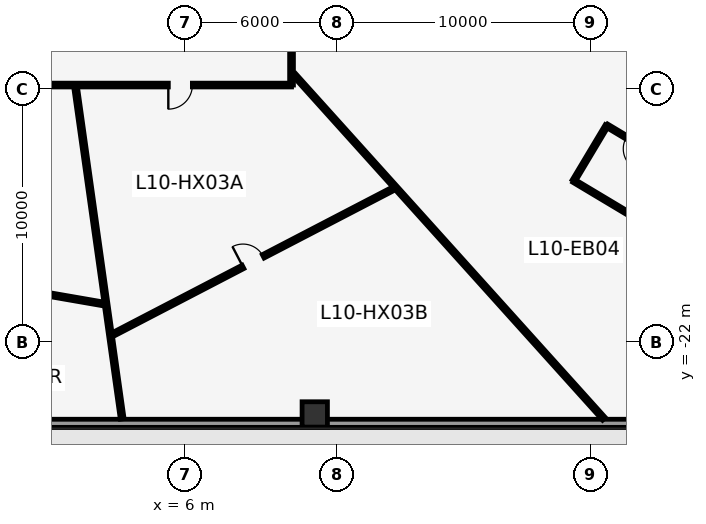
"""IFC4 building model, lengths in metres.
Left out: names, types, materials, properties, quantities, classifications, styles, units other than length and angle.
Written with IfcOpenShell. Run it as: python <this file> out.ifc"""

import sys

from ifc_helpers import new_model, si_unit, direction, frame, frame_2d, origin, origin_2d, place, context, subcontext, project, spatial, rectangle, hollow_rectangle, extrude, element, fill, save


model = new_model("IFC4")
c1 = context("Model", 3, precision=1e-05, world=origin(), true_north=direction((0.0, 1.0)))
c2 = subcontext(c1, "Body", "Model", "MODEL_VIEW")
j1 = project(units=[si_unit("LENGTHUNIT", "METRE"), si_unit("PLANEANGLEUNIT", "RADIAN")], contexts=[c1])
p1 = place(None, origin())
s1 = spatial("IfcSite", under=j1, at=p1, CompositionType="ELEMENT")
p2 = place(p1, origin())
s2 = spatial("IfcBuilding", under=s1, at=p2, CompositionType="ELEMENT")
p3 = place(p2, frame((0.0, 0.0, 50.4)))
s3 = spatial("IfcBuildingStorey", under=s2, at=p3, CompositionType="ELEMENT", Elevation=50.4)
p4 = place(p3, frame((11.117, -24.85, 0.0), z_axis=(0.0, 0.0, 1.0), x_axis=(1.0, 0.0, 0.0)))
e1 = element("IfcColumn", 1, at=p4, inside=s3, PredefinedType="COLUMN", context=c2, shape_type="SweptSolid", body=[
    extrude(hollow_rectangle(XDim=1.0, YDim=1.0, WallThickness=0.06, at=origin_2d()), origin(), (0.0, 0.0, 1.0), 4.0),
])
p5 = place(p3, frame((4.923, 41.122, 0.0), z_axis=(0.0, 0.0, 1.0), x_axis=(0.504213113214, -0.863579258935, 0.0)))
e2 = element("IfcWall", 2, at=p5, inside=s3, PredefinedType="STANDARD", context=c2, shape_type="SweptSolid", body=[
    extrude(rectangle(XDim=67.041, YDim=0.32, at=frame_2d((33.521, 0.0))), origin(), (0.0, 0.0, 1.0), 3.75),
])
p6 = place(p5, frame((33.021, 0.0, 0.0)))
e3 = element("IfcOpeningElement", 3, at=p6, cuts=e2, PredefinedType="OPENING", context=c2, shape_type="SweptSolid", body=[
    extrude(rectangle(XDim=1.0, YDim=2.15, at=frame_2d((0.5, 1.075))), frame((0.0, 0.17, 0.0), z_axis=(0.0, -1.0, 0.0), x_axis=(1.0, 0.0, 0.0)), (0.0, 0.0, 1.0), 0.34),
])
p7 = place(p3, frame((33.888, -25.2, 0.0), z_axis=(0.0, 0.0, 1.0), x_axis=(-1.0, 0.0, 0.0)))
e4 = element("IfcWall", 4, at=p7, inside=s3, PredefinedType="STANDARD", context=c2, shape_type="SweptSolid", body=[
    extrude(rectangle(XDim=67.776, YDim=0.32, at=frame_2d((33.888, 0.0))), origin(), (0.0, 0.0, 1.0), 3.75),
])
p8 = place(p7, frame((33.388, 0.0, 0.0)))
e5 = element("IfcOpeningElement", 5, at=p8, cuts=e4, PredefinedType="OPENING", context=c2, shape_type="SweptSolid", body=[
    extrude(rectangle(XDim=1.0, YDim=2.15, at=frame_2d((0.5, 1.075))), frame((0.0, 0.17, 0.0), z_axis=(0.0, -1.0, 0.0), x_axis=(1.0, 0.0, 0.0)), (0.0, 0.0, 1.0), 0.34),
])
p9 = place(p3, frame((10.2, 12.15, 0.0), z_axis=(0.0, 0.0, 1.0), x_axis=(0.0, -1.0, 0.0)))
e6 = element("IfcWall", 6, at=p9, inside=s3, PredefinedType="PARTITIONING", context=c2, shape_type="SweptSolid", body=[
    extrude(rectangle(XDim=24.0, YDim=0.15, at=frame_2d((12.0, 0.0))), origin(), (0.0, 0.0, 1.0), 3.75),
])
p10 = place(p9, frame((18.691, 0.0, 0.0)))
e7 = element("IfcOpeningElement", 7, at=p10, cuts=e6, PredefinedType="OPENING", context=c2, shape_type="SweptSolid", body=[
    extrude(rectangle(XDim=0.95, YDim=2.15, at=frame_2d((0.475, 1.075))), frame((0.0, 0.085, 0.0), z_axis=(0.0, -1.0, 0.0), x_axis=(1.0, 0.0, 0.0)), (0.0, 0.0, 1.0), 0.17),
])
p11 = place(p9, frame((11.086, 0.0, 0.0)))
e8 = element("IfcOpeningElement", 8, at=p11, cuts=e6, PredefinedType="OPENING", context=c2, shape_type="SweptSolid", body=[
    extrude(rectangle(XDim=0.95, YDim=2.15, at=frame_2d((0.475, 1.075))), frame((0.0, 0.085, 0.0), z_axis=(0.0, -1.0, 0.0), x_axis=(1.0, 0.0, 0.0)), (0.0, 0.0, 1.0), 0.17),
])
p12 = place(p9, frame((4.068, 0.0, 0.0)))
e9 = element("IfcOpeningElement", 9, at=p12, cuts=e6, PredefinedType="OPENING", context=c2, shape_type="SweptSolid", body=[
    extrude(rectangle(XDim=0.95, YDim=2.15, at=frame_2d((0.475, 1.075))), frame((0.0, 0.085, 0.0), z_axis=(0.0, -1.0, 0.0), x_axis=(1.0, 0.0, 0.0)), (0.0, 0.0, 1.0), 0.17),
])
p13 = place(p3, frame((10.2, -11.85, 0.0), z_axis=(0.0, 0.0, 1.0), x_axis=(-1.0, 0.0, 0.0)))
e10 = element("IfcWall", 10, at=p13, inside=s3, PredefinedType="PARTITIONING", context=c2, shape_type="SweptSolid", body=[
    extrude(rectangle(XDim=20.4, YDim=0.15, at=frame_2d((10.2, 0.0))), origin(), (0.0, 0.0, 1.0), 3.75),
])
p14 = place(p13, frame((11.796, 0.0, 0.0)))
e11 = element("IfcOpeningElement", 11, at=p14, cuts=e10, PredefinedType="OPENING", context=c2, shape_type="SweptSolid", body=[
    extrude(rectangle(XDim=0.95, YDim=2.15, at=frame_2d((0.475, 1.075))), frame((0.0, 0.085, 0.0), z_axis=(0.0, -1.0, 0.0), x_axis=(1.0, 0.0, 0.0)), (0.0, 0.0, 1.0), 0.17),
])
p15 = place(p13, frame((3.913, 0.0, 0.0)))
e12 = element("IfcOpeningElement", 12, at=p15, cuts=e10, PredefinedType="OPENING", context=c2, shape_type="SweptSolid", body=[
    extrude(rectangle(XDim=0.95, YDim=2.15, at=frame_2d((0.475, 1.075))), frame((0.0, 0.085, 0.0), z_axis=(0.0, -1.0, 0.0), x_axis=(1.0, 0.0, 0.0)), (0.0, 0.0, 1.0), 0.17),
])
p16 = place(p3, frame((1.68, -11.955, 0.0), z_axis=(0.0, 0.0, 1.0), x_axis=(0.139178306215, -0.990267337177, 0.0)))
e13 = element("IfcWall", 13, at=p16, inside=s3, PredefinedType="PARTITIONING", context=c2, shape_type="SweptSolid", body=[
    extrude(rectangle(XDim=13.198, YDim=0.15, at=frame_2d((6.599, 0.0))), origin(), (0.0, 0.0, 1.0), 3.75),
])
p17 = place(p3, frame((10.305, -11.445, 0.0), z_axis=(0.0, 0.0, 1.0), x_axis=(0.669137434477, -0.743138677355, 0.0)))
e14 = element("IfcWall", 14, at=p17, inside=s3, PredefinedType="PARTITIONING", context=c2, shape_type="SweptSolid", body=[
    extrude(rectangle(XDim=18.274, YDim=0.15, at=frame_2d((9.137, 0.0))), origin(), (0.0, 0.0, 1.0), 3.75),
])
p18 = place(p3, frame((-8.972, -18.453, 0.0), z_axis=(0.0, 0.0, 1.0), x_axis=(0.985300581804, -0.170829632957, 0.0)))
e15 = element("IfcWall", 15, at=p18, inside=s3, PredefinedType="PARTITIONING", context=c2, shape_type="SweptSolid", body=[
    extrude(rectangle(XDim=12.005, YDim=0.15, at=frame_2d((6.002, 0.0))), origin(), (0.0, 0.0, 1.0), 3.254),
])
p19 = place(p18, frame((5.552, 0.0, 0.0)))
e16 = element("IfcOpeningElement", 16, at=p19, cuts=e15, PredefinedType="OPENING", context=c2, shape_type="SweptSolid", body=[
    extrude(rectangle(XDim=0.9, YDim=2.1, at=frame_2d((0.45, 1.05))), frame((0.0, 0.085, 0.0), z_axis=(0.0, -1.0, 0.0), x_axis=(1.0, 0.0, 0.0)), (0.0, 0.0, 1.0), 0.17),
])
p20 = place(p3, frame((3.079, -21.732, 0.0), z_axis=(0.0, 0.0, 1.0), x_axis=(0.887285458414, 0.461220679596, 0.0)))
e17 = element("IfcWall", 17, at=p20, inside=s3, PredefinedType="PARTITIONING", context=c2, shape_type="SweptSolid", body=[
    extrude(rectangle(XDim=12.632, YDim=0.15, at=frame_2d((6.316, 0.0))), origin(), (0.0, 0.0, 1.0), 3.75),
])
p21 = place(p20, frame((5.866, 0.0, 0.0)))
e18 = element("IfcOpeningElement", 18, at=p21, cuts=e17, PredefinedType="OPENING", context=c2, shape_type="SweptSolid", body=[
    extrude(rectangle(XDim=0.9, YDim=2.1, at=frame_2d((0.45, 1.05))), frame((0.0, 0.085, 0.0), z_axis=(0.0, -1.0, 0.0), x_axis=(1.0, 0.0, 0.0)), (0.0, 0.0, 1.0), 0.17),
])
p22 = place(p3, frame((21.337, -15.629, 0.0), z_axis=(0.0, 0.0, 1.0), x_axis=(0.858092929116, -0.513494425482, 0.0)))
e19 = element("IfcWall", 19, at=p22, inside=s3, PredefinedType="PARTITIONING", context=c2, shape_type="SweptSolid", body=[
    extrude(rectangle(XDim=2.69, YDim=0.14, at=frame_2d((1.345, 0.0))), origin(), (0.0, 0.0, 1.0), 3.75),
])
p23 = place(p3, frame((24.95, -14.831, 0.0), z_axis=(0.0, 0.0, 1.0), x_axis=(-0.858092929116, 0.513494425482, 0.0)))
e20 = element("IfcWall", 20, at=p23, inside=s3, PredefinedType="PARTITIONING", context=c2, shape_type="SweptSolid", body=[
    extrude(rectangle(XDim=2.69, YDim=0.14, at=frame_2d((1.345, 0.0))), origin(), (0.0, 0.0, 1.0), 3.75),
])
p24 = place(p23, frame((0.905, 0.0, 0.0)))
e21 = element("IfcOpeningElement", 21, at=p24, cuts=e20, PredefinedType="OPENING", context=c2, shape_type="SweptSolid", body=[
    extrude(rectangle(XDim=0.88, YDim=2.1, at=frame_2d((0.44, 1.05))), frame((0.0, 0.08, 0.0), z_axis=(0.0, -1.0, 0.0), x_axis=(1.0, 0.0, 0.0)), (0.0, 0.0, 1.0), 0.16),
])
p25 = place(p3, frame((22.641, -13.45, 0.0), z_axis=(0.0, 0.0, 1.0), x_axis=(-0.51356253356, -0.858052168649, 0.0)))
e22 = element("IfcWall", 22, at=p25, inside=s3, PredefinedType="PARTITIONING", context=c2, shape_type="SweptSolid", body=[
    extrude(rectangle(XDim=2.54, YDim=0.14, at=frame_2d((1.27, 0.0))), origin(), (0.0, 0.0, 1.0), 3.75),
])
p26 = place(p21, origin())
e23 = element("IfcDoor", 23, at=p26, inside=s3, OperationType="SINGLE_SWING_LEFT", PredefinedType="DOOR", context=c2, shape_type="SweptSolid", body=[
    extrude(rectangle(XDim=0.9, YDim=2.1, at=frame_2d((0.45, 1.05))), frame((0.0, 0.025, 0.0), z_axis=(0.0, -1.0, 0.0), x_axis=(1.0, 0.0, 0.0)), (0.0, 0.0, 1.0), 0.05),
])
fill(e18, e23)
p27 = place(p24, origin())
e24 = element("IfcDoor", 24, at=p27, inside=s3, OperationType="SINGLE_SWING_LEFT", PredefinedType="DOOR", context=c2, shape_type="SweptSolid", body=[
    extrude(rectangle(XDim=0.88, YDim=2.1, at=frame_2d((0.44, 1.05))), frame((0.0, 0.025, 0.0), z_axis=(0.0, -1.0, 0.0), x_axis=(1.0, 0.0, 0.0)), (0.0, 0.0, 1.0), 0.05),
])
fill(e21, e24)
p28 = place(p15, origin())
e25 = element("IfcDoor", 25, at=p28, inside=s3, OperationType="SINGLE_SWING_RIGHT", PredefinedType="DOOR", context=c2, shape_type="SweptSolid", body=[
    extrude(rectangle(XDim=0.95, YDim=2.15, at=frame_2d((0.475, 1.075))), frame((0.0, 0.025, 0.0), z_axis=(0.0, -1.0, 0.0), x_axis=(1.0, 0.0, 0.0)), (0.0, 0.0, 1.0), 0.05),
])
fill(e12, e25)
save(model, sys.argv[1])
